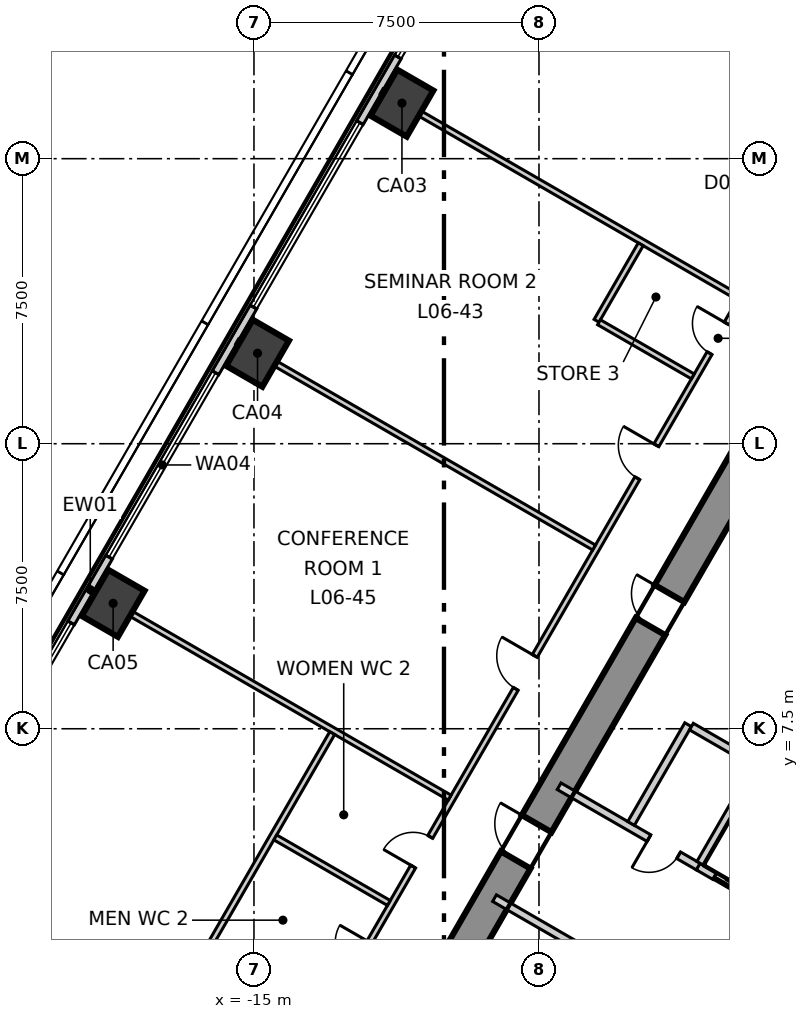
"""IFC4 building model, lengths in metres.
Left out: names, types, materials, properties, quantities, classifications, styles, units other than length and angle.
Written with IfcOpenShell. Run it as: python <this file> out.ifc"""

import sys

from ifc_helpers import new_model, si_unit, direction, frame, frame_2d, origin, origin_2d, place, context, subcontext, project, spatial, polyline, rectangle, outline, extrude, element, fill, save


model = new_model("IFC4")
c1 = context("Model", 3, precision=1e-05, world=origin(), true_north=direction((0.0, 1.0)))
c2 = subcontext(c1, "Body", "Model", "MODEL_VIEW")
j1 = project(units=[si_unit("LENGTHUNIT", "METRE"), si_unit("PLANEANGLEUNIT", "RADIAN")], contexts=[c1])
p1 = place(None, origin())
s1 = spatial("IfcSite", under=j1, at=p1, CompositionType="ELEMENT")
p2 = place(p1, origin())
s2 = spatial("IfcBuilding", under=s1, at=p2, CompositionType="ELEMENT")
p3 = place(p2, frame((0.0, 0.0, 35.3)))
s3 = spatial("IfcBuildingStorey", under=s2, at=p3, CompositionType="ELEMENT", Elevation=35.3)
p4 = place(p3, frame((-1.645, 15.25, -0.3), z_axis=(0.0, 0.0, 1.0), x_axis=(-0.500026485275, -0.866010111964, 0.0)))
e1 = element("IfcWall", 1, at=p4, inside=s3, PredefinedType="SHEAR", context=c2, shape_type="SweptSolid", body=[
    extrude(outline(polyline([(-0.26, -0.45), (1.685, -0.45), (3.63, -0.45), (5.576, -0.45), (7.521, -0.45), (9.466, -0.449), (11.411, -0.449), (13.357, -0.449), (15.302, -0.449), (17.247, -0.449), (19.192, -0.449), (21.138, -0.449), (23.083, -0.449), (25.028, -0.449), (24.509, 0.45), (22.644, 0.45), (20.778, 0.45), (18.913, 0.45), (17.048, 0.45), (15.182, 0.449), (13.317, 0.449), (11.452, 0.449), (9.587, 0.449), (7.721, 0.449), (5.856, 0.449), (3.991, 0.449), (2.125, 0.449), (0.26, 0.449), (-0.26, -0.45)])), origin(), (0.0, 0.0, 1.0), 4.0),
])
p5 = place(p4, frame((11.834, 0.0, 0.3)))
e2 = element("IfcOpeningElement", 2, at=p5, cuts=e1, PredefinedType="OPENING", context=c2, shape_type="SweptSolid", body=[
    extrude(rectangle(XDim=1.1, YDim=2.1, at=frame_2d((0.55, 1.05))), frame((0.0, 0.46, 0.0), z_axis=(0.0, -1.0, 0.0), x_axis=(1.0, 0.0, 0.0)), (0.0, 0.0, 1.0), 0.92),
])
p6 = place(p4, frame((4.842, 0.0, 0.3)))
e3 = element("IfcOpeningElement", 3, at=p6, cuts=e1, PredefinedType="OPENING", context=c2, shape_type="SweptSolid", body=[
    extrude(rectangle(XDim=1.0, YDim=2.1, at=frame_2d((0.5, 1.05))), frame((0.0, 0.46, 0.0), z_axis=(0.0, -1.0, 0.0), x_axis=(1.0, 0.0, 0.0)), (0.0, 0.0, 1.0), 0.92),
])
for number, where, z_axis, x_axis in (
    (4, (-11.106, 23.962, -0.3), (0.0, 0.0, 1.0), (0.5, 0.866, 0.0)),
    (5, (-14.906, 17.381, -0.3), (0.0, 0.0, 1.0), (0.5, 0.866, 0.0)),
    (6, (-18.706, 10.8, -0.3), (0.0, 0.0, 1.0), (0.5, 0.866, 0.0)),
):
    element("IfcColumn", number, at=place(p3, frame(where, z_axis=z_axis, x_axis=x_axis)), inside=s3, PredefinedType="COLUMN", context=c2, shape_type="SweptSolid", body=[
        extrude(rectangle(XDim=1.4, YDim=1.1, at=origin_2d()), origin(), (0.0, 0.0, 1.0), 4.0),
    ])
p7 = place(p3, frame((-3.462, 38.603, 0.0), z_axis=(0.0, 0.0, 1.0), x_axis=(-0.500012207976, -0.866018355391, 0.0)))
e7 = element("IfcWall", 7, at=p7, inside=s3, PredefinedType="ELEMENTEDWALL", context=c2, shape_type="SweptSolid", body=[
    extrude(rectangle(XDim=63.381, YDim=0.2, at=frame_2d((31.69, 0.0))), origin(), (0.0, 0.0, 1.0), 3.7),
])
p8 = place(p7, frame((2.302, 0.0, 0.9)))
e8 = element("IfcOpeningElement", 8, at=p8, cuts=e7, PredefinedType="OPENING", context=c2, shape_type="SweptSolid", body=[
    extrude(rectangle(XDim=5.6, YDim=2.5, at=frame_2d((2.8, 1.25))), frame((0.0, 0.11, 0.0), z_axis=(0.0, -1.0, 0.0), x_axis=(1.0, 0.0, 0.0)), (0.0, 0.0, 1.0), 0.22),
])
p9 = place(p7, frame((9.902, 0.0, 0.9)))
e9 = element("IfcOpeningElement", 9, at=p9, cuts=e7, PredefinedType="OPENING", context=c2, shape_type="SweptSolid", body=[
    extrude(rectangle(XDim=5.6, YDim=2.5, at=frame_2d((2.8, 1.25))), frame((0.0, 0.11, 0.0), z_axis=(0.0, -1.0, 0.0), x_axis=(1.0, 0.0, 0.0)), (0.0, 0.0, 1.0), 0.22),
])
p10 = place(p7, frame((17.501, 0.0, 0.9)))
e10 = element("IfcOpeningElement", 10, at=p10, cuts=e7, PredefinedType="OPENING", context=c2, shape_type="SweptSolid", body=[
    extrude(rectangle(XDim=5.6, YDim=2.5, at=frame_2d((2.8, 1.25))), frame((0.0, 0.11, 0.0), z_axis=(0.0, -1.0, 0.0), x_axis=(1.0, 0.0, 0.0)), (0.0, 0.0, 1.0), 0.22),
])
p11 = place(p7, frame((25.1, 0.0, 0.9)))
e11 = element("IfcOpeningElement", 11, at=p11, cuts=e7, PredefinedType="OPENING", context=c2, shape_type="SweptSolid", body=[
    extrude(rectangle(XDim=5.6, YDim=2.5, at=frame_2d((2.8, 1.25))), frame((0.0, 0.11, 0.0), z_axis=(0.0, -1.0, 0.0), x_axis=(1.0, 0.0, 0.0)), (0.0, 0.0, 1.0), 0.22),
])
p12 = place(p7, frame((32.7, 0.0, 0.9)))
e12 = element("IfcOpeningElement", 12, at=p12, cuts=e7, PredefinedType="OPENING", context=c2, shape_type="SweptSolid", body=[
    extrude(rectangle(XDim=5.6, YDim=2.5, at=frame_2d((2.8, 1.25))), frame((0.0, 0.11, 0.0), z_axis=(0.0, -1.0, 0.0), x_axis=(1.0, 0.0, 0.0)), (0.0, 0.0, 1.0), 0.22),
])
p13 = place(p7, frame((40.299, 0.0, 0.9)))
e13 = element("IfcOpeningElement", 13, at=p13, cuts=e7, PredefinedType="OPENING", context=c2, shape_type="SweptSolid", body=[
    extrude(rectangle(XDim=5.6, YDim=2.5, at=frame_2d((2.8, 1.25))), frame((0.0, 0.11, 0.0), z_axis=(0.0, -1.0, 0.0), x_axis=(1.0, 0.0, 0.0)), (0.0, 0.0, 1.0), 0.22),
])
p14 = place(p7, frame((47.899, 0.0, 0.9)))
e14 = element("IfcOpeningElement", 14, at=p14, cuts=e7, PredefinedType="OPENING", context=c2, shape_type="SweptSolid", body=[
    extrude(rectangle(XDim=5.6, YDim=2.5, at=frame_2d((2.8, 1.25))), frame((0.0, 0.11, 0.0), z_axis=(0.0, -1.0, 0.0), x_axis=(1.0, 0.0, 0.0)), (0.0, 0.0, 1.0), 0.22),
])
p15 = place(p7, frame((55.498, 0.0, 0.9)))
e15 = element("IfcOpeningElement", 15, at=p15, cuts=e7, PredefinedType="OPENING", context=c2, shape_type="SweptSolid", body=[
    extrude(rectangle(XDim=5.6, YDim=2.5, at=frame_2d((2.8, 1.25))), frame((0.0, 0.11, 0.0), z_axis=(0.0, -1.0, 0.0), x_axis=(1.0, 0.0, 0.0)), (0.0, 0.0, 1.0), 0.22),
])
p16 = place(p3, frame((-19.497, -11.17, 0.0), z_axis=(0.0, 0.0, 1.0), x_axis=(0.499998854553, 0.866026065108, 0.0)))
e16 = element("IfcWall", 16, at=p16, inside=s3, PredefinedType="PARTITIONING", context=c2, shape_type="SweptSolid", body=[
    extrude(rectangle(XDim=38.994, YDim=0.15, at=frame_2d((19.497, 0.0))), origin(), (0.0, 0.0, 1.0), 3.7),
])
p17 = place(p16, frame((36.244, 0.0, 0.0)))
e17 = element("IfcOpeningElement", 17, at=p17, cuts=e16, PredefinedType="OPENING", context=c2, shape_type="SweptSolid", body=[
    extrude(rectangle(XDim=1.1, YDim=2.1, at=frame_2d((0.55, 1.05))), frame((0.0, 0.085, 0.0), z_axis=(0.0, -1.0, 0.0), x_axis=(1.0, 0.0, 0.0)), (0.0, 0.0, 1.0), 0.17),
])
p18 = place(p16, frame((29.171, 0.0, 0.0)))
e18 = element("IfcOpeningElement", 18, at=p18, cuts=e16, PredefinedType="OPENING", context=c2, shape_type="SweptSolid", body=[
    extrude(rectangle(XDim=1.0, YDim=2.1, at=frame_2d((0.5, 1.05))), frame((0.0, 0.085, 0.0), z_axis=(0.0, -1.0, 0.0), x_axis=(1.0, 0.0, 0.0)), (0.0, 0.0, 1.0), 0.17),
])
p19 = place(p16, frame((32.971, 0.0, 0.0)))
e19 = element("IfcOpeningElement", 19, at=p19, cuts=e16, PredefinedType="OPENING", context=c2, shape_type="SweptSolid", body=[
    extrude(rectangle(XDim=0.9, YDim=2.1, at=frame_2d((0.45, 1.05))), frame((0.0, 0.085, 0.0), z_axis=(0.0, -1.0, 0.0), x_axis=(1.0, 0.0, 0.0)), (0.0, 0.0, 1.0), 0.17),
])
p20 = place(p16, frame((22.771, 0.0, 0.0)))
e20 = element("IfcOpeningElement", 20, at=p20, cuts=e16, PredefinedType="OPENING", context=c2, shape_type="SweptSolid", body=[
    extrude(rectangle(XDim=1.0, YDim=2.1, at=frame_2d((0.5, 1.05))), frame((0.0, 0.085, 0.0), z_axis=(0.0, -1.0, 0.0), x_axis=(1.0, 0.0, 0.0)), (0.0, 0.0, 1.0), 0.17),
])
p21 = place(p16, frame((6.872, 0.0, 0.0)))
e21 = element("IfcOpeningElement", 21, at=p21, cuts=e16, PredefinedType="OPENING", context=c2, shape_type="SweptSolid", body=[
    extrude(rectangle(XDim=1.1, YDim=2.1, at=frame_2d((0.55, 1.05))), frame((0.0, 0.085, 0.0), z_axis=(0.0, -1.0, 0.0), x_axis=(1.0, 0.0, 0.0)), (0.0, 0.0, 1.0), 0.17),
])
p22 = place(p16, frame((17.372, 0.0, 0.0)))
e22 = element("IfcOpeningElement", 22, at=p22, cuts=e16, PredefinedType="OPENING", context=c2, shape_type="SweptSolid", body=[
    extrude(rectangle(XDim=0.9, YDim=2.1, at=frame_2d((0.45, 1.05))), frame((0.0, 0.085, 0.0), z_axis=(0.0, -1.0, 0.0), x_axis=(1.0, 0.0, 0.0)), (0.0, 0.0, 1.0), 0.17),
])
p23 = place(p16, frame((14.172, 0.0, 0.0)))
e23 = element("IfcOpeningElement", 23, at=p23, cuts=e16, PredefinedType="OPENING", context=c2, shape_type="SweptSolid", body=[
    extrude(rectangle(XDim=0.9, YDim=2.1, at=frame_2d((0.45, 1.05))), frame((0.0, 0.085, 0.0), z_axis=(0.0, -1.0, 0.0), x_axis=(1.0, 0.0, 0.0)), (0.0, 0.0, 1.0), 0.17),
])
p24 = place(p16, frame((11.272, 0.0, 0.0)))
e24 = element("IfcOpeningElement", 24, at=p24, cuts=e16, PredefinedType="OPENING", context=c2, shape_type="SweptSolid", body=[
    extrude(rectangle(XDim=1.0, YDim=2.1, at=frame_2d((0.5, 1.05))), frame((0.0, 0.085, 0.0), z_axis=(0.0, -1.0, 0.0), x_axis=(1.0, 0.0, 0.0)), (0.0, 0.0, 1.0), 0.17),
])
p25 = place(p16, frame((1.473, 0.0, 0.0)))
e25 = element("IfcOpeningElement", 25, at=p25, cuts=e16, PredefinedType="OPENING", context=c2, shape_type="SweptSolid", body=[
    extrude(rectangle(XDim=1.1, YDim=2.1, at=frame_2d((0.55, 1.05))), frame((0.0, 0.085, 0.0), z_axis=(0.0, -1.0, 0.0), x_axis=(1.0, 0.0, 0.0)), (0.0, 0.0, 1.0), 0.17),
])
p26 = place(p3, frame((-19.243, 11.11, 0.0), z_axis=(0.0, 0.0, 1.0), x_axis=(0.866036004841, -0.499981637982, 0.0)))
e26 = element("IfcWall", 26, at=p26, inside=s3, PredefinedType="PARTITIONING", context=c2, shape_type="SweptSolid", body=[
    extrude(rectangle(XDim=10.845, YDim=0.15, at=frame_2d((5.422, 0.0))), origin(), (0.0, 0.0, 1.0), 3.2),
])
p27 = place(p3, frame((-17.304, -0.171, 0.0), z_axis=(0.0, 0.0, 1.0), x_axis=(0.500054279689, 0.865994063124, 0.0)))
e27 = element("IfcWall", 27, at=p27, inside=s3, PredefinedType="PARTITIONING", context=c2, shape_type="SweptSolid", body=[
    extrude(rectangle(XDim=8.725, YDim=0.15, at=frame_2d((4.363, 0.0))), origin(), (0.0, 0.0, 1.0), 3.7),
])
p28 = place(p3, frame((-15.443, 17.691, 0.0), z_axis=(0.0, 0.0, 1.0), x_axis=(0.866051380023, -0.499955005135, 0.0)))
e28 = element("IfcWall", 28, at=p28, inside=s3, PredefinedType="PARTITIONING", context=c2, shape_type="SweptSolid", body=[
    extrude(rectangle(XDim=10.845, YDim=0.15, at=frame_2d((5.422, 0.0))), origin(), (0.0, 0.0, 1.0), 3.7),
])
p29 = place(p3, frame((-14.439, 4.641, 0.0), z_axis=(0.0, 0.0, 1.0), x_axis=(0.866031223622, -0.49998991961, 0.0)))
e29 = element("IfcWall", 29, at=p29, inside=s3, PredefinedType="PARTITIONING", context=c2, shape_type="SweptSolid", body=[
    extrude(rectangle(XDim=3.45, YDim=0.15, at=frame_2d((1.725, 0.0))), origin(), (0.0, 0.0, 1.0), 3.7),
])
p30 = place(p3, frame((-11.643, 24.272, 0.0), z_axis=(0.0, 0.0, 1.0), x_axis=(0.866028869058, -0.499993997921, 0.0)))
e30 = element("IfcWall", 30, at=p30, inside=s3, PredefinedType="PARTITIONING", context=c2, shape_type="SweptSolid", body=[
    extrude(rectangle(XDim=10.844, YDim=0.15, at=frame_2d((5.422, 0.0))), origin(), (0.0, 0.0, 1.0), 3.7),
])
p31 = place(p3, frame((-5.985, 18.234, 0.0), z_axis=(0.0, 0.0, 1.0), x_axis=(0.500067724834, 0.865986299303, 0.0)))
e31 = element("IfcWall", 31, at=p31, inside=s3, PredefinedType="PARTITIONING", context=c2, shape_type="SweptSolid", body=[
    extrude(rectangle(XDim=2.326, YDim=0.15, at=frame_2d((1.163, 0.0))), origin(), (0.0, 0.0, 1.0), 3.7),
])
p32 = place(p3, frame((-5.92, 18.196, 0.0), z_axis=(0.0, 0.0, 1.0), x_axis=(0.866004402611, -0.500036373335, 0.0)))
e32 = element("IfcWall", 32, at=p32, inside=s3, PredefinedType="PARTITIONING", context=c2, shape_type="SweptSolid", body=[
    extrude(rectangle(XDim=2.85, YDim=0.15, at=frame_2d((1.425, 0.0))), origin(), (0.0, 0.0, 1.0), 3.7),
])
p33 = place(p3, frame((-8.67, 3.043, 0.0), z_axis=(0.0, 0.0, 1.0), x_axis=(0.866029956157, -0.499992114976, 0.0)))
e33 = element("IfcWall", 33, at=p33, inside=s3, PredefinedType="SOLIDWALL", context=c2, shape_type="SweptSolid", body=[
    extrude(rectangle(XDim=4.232, YDim=0.2, at=frame_2d((2.116, 0.0))), origin(), (0.0, 0.0, 1.0), 3.7),
])
p34 = place(p33, frame((2.63, 0.0, 0.0)))
e34 = element("IfcOpeningElement", 34, at=p34, cuts=e33, PredefinedType="OPENING", context=c2, shape_type="SweptSolid", body=[
    extrude(rectangle(XDim=1.1, YDim=2.1, at=frame_2d((0.55, 1.05))), frame((0.0, 0.11, 0.0), z_axis=(0.0, -1.0, 0.0), x_axis=(1.0, 0.0, 0.0)), (0.0, 0.0, 1.0), 0.22),
])
p35 = place(p3, frame((-6.97, 5.987, 0.0), z_axis=(0.0, 0.0, 1.0), x_axis=(0.866029956157, -0.499992114976, 0.0)))
e35 = element("IfcWall", 35, at=p35, inside=s3, PredefinedType="SOLIDWALL", context=c2, shape_type="SweptSolid", body=[
    extrude(rectangle(XDim=4.232, YDim=0.2, at=frame_2d((2.116, 0.0))), origin(), (0.0, 0.0, 1.0), 3.7),
])
p36 = place(p35, frame((2.73, 0.0, 0.0)))
e36 = element("IfcOpeningElement", 36, at=p36, cuts=e35, PredefinedType="OPENING", context=c2, shape_type="SweptSolid", body=[
    extrude(rectangle(XDim=0.9, YDim=2.1, at=frame_2d((0.45, 1.05))), frame((0.0, 0.11, 0.0), z_axis=(0.0, -1.0, 0.0), x_axis=(1.0, 0.0, 0.0)), (0.0, 0.0, 1.0), 0.22),
])
p37 = place(p3, frame((-5.076, 5.009, 0.0), z_axis=(0.0, 0.0, 1.0), x_axis=(0.50002537861, 0.866010750942, 0.0)))
e37 = element("IfcWall", 37, at=p37, inside=s3, PredefinedType="SOLIDWALL", context=c2, shape_type="SweptSolid", body=[
    extrude(rectangle(XDim=3.0, YDim=0.2, at=frame_2d((1.5, 0.0))), origin(), (0.0, 0.0, 1.0), 3.7),
])
p38 = place(p3, frame((-3.489, 7.557, 0.0), z_axis=(0.0, 0.0, 1.0), x_axis=(0.866010750942, -0.50002537861, 0.0)))
e38 = element("IfcWall", 38, at=p38, inside=s3, PredefinedType="SOLIDWALL", context=c2, shape_type="SweptSolid", body=[
    extrude(rectangle(XDim=2.0, YDim=0.2, at=frame_2d((1.0, 0.0))), origin(), (0.0, 0.0, 1.0), 3.7),
])
p39 = place(p3, frame((-2.444, -0.433, 0.0), z_axis=(0.0, 0.0, 1.0), x_axis=(0.500035624827, 0.866004834804, 0.0)))
e39 = element("IfcWall", 39, at=p39, inside=s3, PredefinedType="SOLIDWALL", context=c2, shape_type="SweptSolid", body=[
    extrude(rectangle(XDim=3.194, YDim=0.2, at=frame_2d((1.597, 0.0))), origin(), (0.0, 0.0, 1.0), 3.7),
])
p40 = place(p3, frame((-3.309, 3.873, 0.0), z_axis=(0.0, 0.0, 1.0), x_axis=(0.866098583652, -0.499873227325, 0.0)))
e40 = element("IfcWall", 40, at=p40, inside=s3, PredefinedType="SOLIDWALL", context=c2, shape_type="SweptSolid", body=[
    extrude(rectangle(XDim=2.103, YDim=0.2, at=frame_2d((1.051, 0.0))), origin(), (0.0, 0.0, 1.0), 3.7),
])
p41 = place(p40, frame((0.502, 0.0, 0.0)))
e41 = element("IfcOpeningElement", 41, at=p41, cuts=e40, PredefinedType="OPENING", context=c2, shape_type="SweptSolid", body=[
    extrude(rectangle(XDim=1.1, YDim=2.1, at=frame_2d((0.55, 1.05))), frame((0.0, 0.11, 0.0), z_axis=(0.0, -1.0, 0.0), x_axis=(1.0, 0.0, 0.0)), (0.0, 0.0, 1.0), 0.22),
])
p42 = place(p3, frame((-3.257, 3.959, 0.0), z_axis=(0.0, 0.0, 1.0), x_axis=(0.50012328804, 0.865954211699, 0.0)))
e42 = element("IfcWall", 42, at=p42, inside=s3, PredefinedType="SOLIDWALL", context=c2, shape_type="SweptSolid", body=[
    extrude(rectangle(XDim=2.9, YDim=0.2, at=frame_2d((1.45, 0.0))), origin(), (0.0, 0.0, 1.0), 3.7),
])
p43 = place(p9, origin())
e43 = element("IfcWindow", 43, at=p43, inside=s3, PartitioningType="SINGLE_PANEL", PredefinedType="WINDOW", context=c2, shape_type="SweptSolid", body=[
    extrude(rectangle(XDim=5.6, YDim=2.5, at=frame_2d((2.8, 1.25))), frame((0.0, 0.03, 0.0), z_axis=(0.0, -1.0, 0.0), x_axis=(1.0, 0.0, 0.0)), (0.0, 0.0, 1.0), 0.06),
])
fill(e9, e43)
p44 = place(p10, origin())
e44 = element("IfcWindow", 44, at=p44, inside=s3, PartitioningType="SINGLE_PANEL", PredefinedType="WINDOW", context=c2, shape_type="SweptSolid", body=[
    extrude(rectangle(XDim=5.6, YDim=2.5, at=frame_2d((2.8, 1.25))), frame((0.0, 0.03, 0.0), z_axis=(0.0, -1.0, 0.0), x_axis=(1.0, 0.0, 0.0)), (0.0, 0.0, 1.0), 0.06),
])
fill(e10, e44)
p45 = place(p11, origin())
e45 = element("IfcWindow", 45, at=p45, inside=s3, PartitioningType="SINGLE_PANEL", PredefinedType="WINDOW", context=c2, shape_type="SweptSolid", body=[
    extrude(rectangle(XDim=5.6, YDim=2.5, at=frame_2d((2.8, 1.25))), frame((0.0, 0.03, 0.0), z_axis=(0.0, -1.0, 0.0), x_axis=(1.0, 0.0, 0.0)), (0.0, 0.0, 1.0), 0.06),
])
fill(e11, e45)
p46 = place(p12, origin())
e46 = element("IfcWindow", 46, at=p46, inside=s3, PartitioningType="SINGLE_PANEL", PredefinedType="WINDOW", context=c2, shape_type="SweptSolid", body=[
    extrude(rectangle(XDim=5.6, YDim=2.5, at=frame_2d((2.8, 1.25))), frame((0.0, 0.03, 0.0), z_axis=(0.0, -1.0, 0.0), x_axis=(1.0, 0.0, 0.0)), (0.0, 0.0, 1.0), 0.06),
])
fill(e12, e46)
p47 = place(p41, origin())
e47 = element("IfcDoor", 47, at=p47, inside=s3, OperationType="SLIDING_TO_LEFT", PredefinedType="DOOR", context=c2, shape_type="SweptSolid", body=[
    extrude(rectangle(XDim=1.1, YDim=2.1, at=frame_2d((0.55, 1.05))), frame((0.0, 0.025, 0.0), z_axis=(0.0, -1.0, 0.0), x_axis=(1.0, 0.0, 0.0)), (0.0, 0.0, 1.0), 0.05),
])
fill(e41, e47)
p48 = place(p36, origin())
e48 = element("IfcDoor", 48, at=p48, inside=s3, OperationType="SINGLE_SWING_LEFT", PredefinedType="DOOR", context=c2, shape_type="SweptSolid", body=[
    extrude(rectangle(XDim=0.9, YDim=2.1, at=frame_2d((0.45, 1.05))), frame((0.0, 0.025, 0.0), z_axis=(0.0, -1.0, 0.0), x_axis=(1.0, 0.0, 0.0)), (0.0, 0.0, 1.0), 0.05),
])
fill(e36, e48)
p49 = place(p18, origin())
e49 = element("IfcDoor", 49, at=p49, inside=s3, OperationType="SINGLE_SWING_LEFT", PredefinedType="DOOR", context=c2, shape_type="SweptSolid", body=[
    extrude(rectangle(XDim=1.0, YDim=2.1, at=frame_2d((0.5, 1.05))), frame((0.0, 0.025, 0.0), z_axis=(0.0, -1.0, 0.0), x_axis=(1.0, 0.0, 0.0)), (0.0, 0.0, 1.0), 0.05),
])
fill(e18, e49)
p50 = place(p19, origin())
e50 = element("IfcDoor", 50, at=p50, inside=s3, OperationType="SINGLE_SWING_LEFT", PredefinedType="DOOR", context=c2, shape_type="SweptSolid", body=[
    extrude(rectangle(XDim=0.9, YDim=2.1, at=frame_2d((0.45, 1.05))), frame((0.0, 0.025, 0.0), z_axis=(0.0, -1.0, 0.0), x_axis=(1.0, 0.0, 0.0)), (0.0, 0.0, 1.0), 0.05),
])
fill(e19, e50)
p51 = place(p20, origin())
e51 = element("IfcDoor", 51, at=p51, inside=s3, OperationType="SINGLE_SWING_LEFT", PredefinedType="DOOR", context=c2, shape_type="SweptSolid", body=[
    extrude(rectangle(XDim=1.0, YDim=2.1, at=frame_2d((0.5, 1.05))), frame((0.0, 0.025, 0.0), z_axis=(0.0, -1.0, 0.0), x_axis=(1.0, 0.0, 0.0)), (0.0, 0.0, 1.0), 0.05),
])
fill(e20, e51)
p52 = place(p22, origin())
e52 = element("IfcDoor", 52, at=p52, inside=s3, OperationType="SINGLE_SWING_RIGHT", PredefinedType="DOOR", context=c2, shape_type="SweptSolid", body=[
    extrude(rectangle(XDim=0.9, YDim=2.1, at=frame_2d((0.45, 1.05))), frame((0.0, 0.025, 0.0), z_axis=(0.0, -1.0, 0.0), x_axis=(1.0, 0.0, 0.0)), (0.0, 0.0, 1.0), 0.05),
])
fill(e22, e52)
p53 = place(p5, origin())
e53 = element("IfcDoor", 53, at=p53, inside=s3, OperationType="SINGLE_SWING_LEFT", PredefinedType="DOOR", context=c2, shape_type="SweptSolid", body=[
    extrude(rectangle(XDim=1.1, YDim=2.1, at=frame_2d((0.55, 1.05))), frame((0.0, 0.025, 0.0), z_axis=(0.0, -1.0, 0.0), x_axis=(1.0, 0.0, 0.0)), (0.0, 0.0, 1.0), 0.05),
])
fill(e2, e53)
p54 = place(p6, origin())
e54 = element("IfcDoor", 54, at=p54, inside=s3, OperationType="SINGLE_SWING_LEFT", PredefinedType="DOOR", context=c2, shape_type="SweptSolid", body=[
    extrude(rectangle(XDim=1.0, YDim=2.1, at=frame_2d((0.5, 1.05))), frame((0.0, 0.025, 0.0), z_axis=(0.0, -1.0, 0.0), x_axis=(1.0, 0.0, 0.0)), (0.0, 0.0, 1.0), 0.05),
])
fill(e3, e54)
save(model, sys.argv[1])
